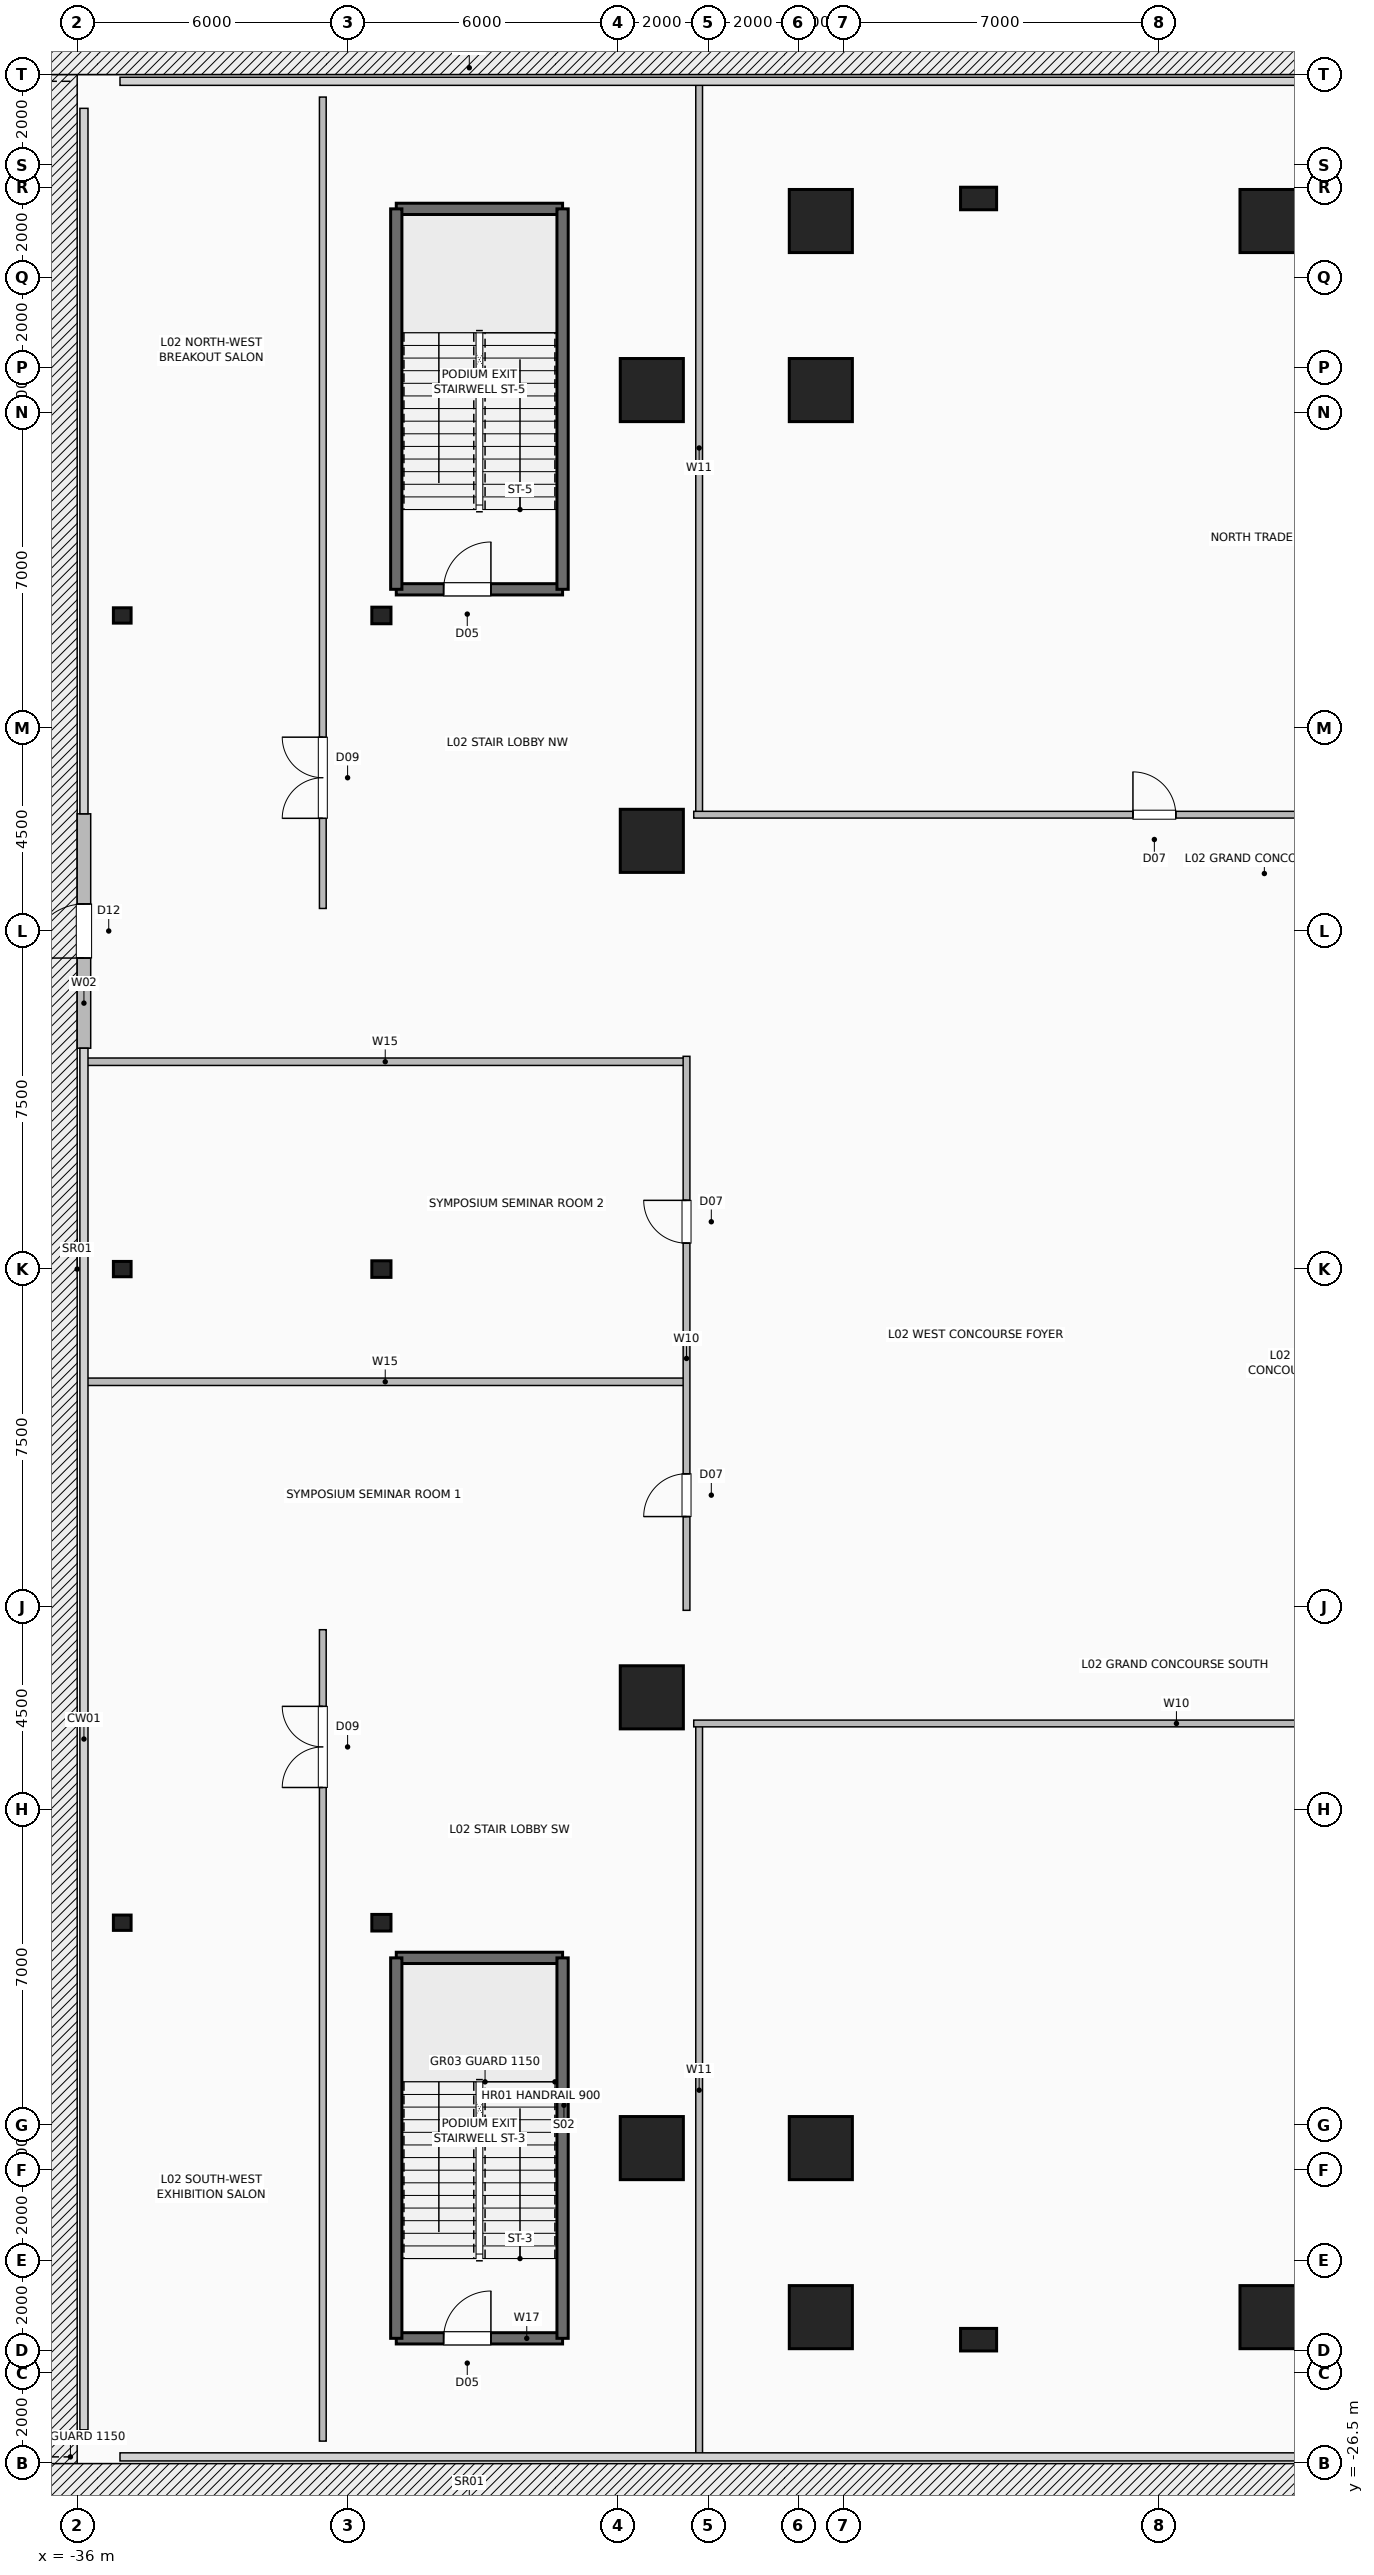
"""IFC4 building model, lengths in metres.
Left out: names, types, materials, properties, quantities, classifications, styles, units other than length and angle.
Written with IfcOpenShell. Run it as: python <this file> out.ifc"""

import sys

from ifc_helpers import new_model, si_unit, direction, frame, frame_2d, origin, origin_2d, place, context, subcontext, project, spatial, rectangle, hollow_rectangle, i_section, extrude, element, fill, save


model = new_model("IFC4")
c1 = context("Model", 3, precision=1e-05, world=origin(), true_north=direction((0.0, 1.0)))
c2 = subcontext(c1, "Body", "Model", "MODEL_VIEW")
j1 = project(units=[si_unit("LENGTHUNIT", "METRE"), si_unit("PLANEANGLEUNIT", "RADIAN")], contexts=[c1])
p1 = place(None, origin())
s1 = spatial("IfcSite", under=j1, at=p1, CompositionType="ELEMENT")
p2 = place(p1, origin())
s2 = spatial("IfcBuilding", under=s1, at=p2, CompositionType="ELEMENT")
p3 = place(p2, frame((0.0, 0.0, 10.8)))
s3 = spatial("IfcBuildingStorey", under=s2, at=p3, CompositionType="ELEMENT", Elevation=10.8)
for number, where, z_axis, x_axis in (
    (1, (-19.5, -23.25, 0.0), (0.0, 0.0, 1.0), (1.0, 0.0, 0.0)),
    (2, (-9.5, -23.25, 0.0), (0.0, 0.0, 1.0), (1.0, 0.0, 0.0)),
    (3, (-19.5, 23.25, 0.0), (0.0, 0.0, 1.0), (1.0, 0.0, 0.0)),
    (4, (-9.5, 23.25, 0.0), (0.0, 0.0, 1.0), (1.0, 0.0, 0.0)),
    (5, (-23.25, -19.5, 0.0), (0.0, 0.0, 1.0), (1.0, 0.0, 0.0)),
    (6, (-23.25, -9.5, 0.0), (0.0, 0.0, 1.0), (1.0, 0.0, 0.0)),
    (7, (-23.25, 9.5, 0.0), (0.0, 0.0, 1.0), (1.0, 0.0, 0.0)),
    (8, (-23.25, 19.5, 0.0), (0.0, 0.0, 1.0), (1.0, 0.0, 0.0)),
    (9, (-19.5, -19.5, 0.0), (0.0, 0.0, 1.0), (1.0, 0.0, 0.0)),
    (10, (-19.5, 19.5, 0.0), (0.0, 0.0, 1.0), (1.0, 0.0, 0.0)),
):
    element("IfcColumn", number, at=place(p3, frame(where, z_axis=z_axis, x_axis=x_axis)), inside=s3, PredefinedType="COLUMN", context=c2, shape_type="SweptSolid", body=[
        extrude(hollow_rectangle(XDim=1.4, YDim=1.4, WallThickness=0.06, at=origin_2d()), origin(), (0.0, 0.0, 1.0), 5.4),
    ])
for number, where, z_axis, x_axis in (
    (11, (-29.25, -14.5, 0.0), (0.0, 0.0, 1.0), (1.0, 0.0, 0.0)),
    (12, (-29.25, 0.0, 0.0), (0.0, 0.0, 1.0), (1.0, 0.0, 0.0)),
    (13, (-29.25, 14.5, 0.0), (0.0, 0.0, 1.0), (1.0, 0.0, 0.0)),
):
    element("IfcColumn", number, at=place(p3, frame(where, z_axis=z_axis, x_axis=x_axis)), inside=s3, PredefinedType="COLUMN", context=c2, shape_type="SweptSolid", body=[
        extrude(i_section(OverallWidth=0.368, OverallDepth=0.425, WebThickness=0.03, FlangeThickness=0.048, FilletRadius=0.02, at=origin_2d()), origin(), (0.0, 0.0, 1.0), 5.4),
    ])
for number, where, z_axis, x_axis in (
    (14, (-35.0, -14.5, -0.4), (0.0, 0.0, 1.0), (1.0, 0.0, 0.0)),
    (15, (-35.0, 0.0, -0.4), (0.0, 0.0, 1.0), (1.0, 0.0, 0.0)),
    (16, (-35.0, 14.5, -0.4), (0.0, 0.0, 1.0), (1.0, 0.0, 0.0)),
):
    element("IfcColumn", number, at=place(p3, frame(where, z_axis=z_axis, x_axis=x_axis)), inside=s3, PredefinedType="COLUMN", context=c2, shape_type="SweptSolid", body=[
        extrude(i_section(OverallWidth=0.34, OverallDepth=0.393, WebThickness=0.02, FlangeThickness=0.033, FilletRadius=0.02, at=origin_2d()), origin(), (0.0, 0.0, 1.0), 5.4),
    ])
for number, where, z_axis, x_axis in (
    (17, (-16.0, -23.75, 0.0), (0.0, 0.0, 1.0), (1.0, 0.0, 0.0)),
    (18, (-16.0, 23.75, 0.0), (0.0, 0.0, 1.0), (1.0, 0.0, 0.0)),
):
    element("IfcColumn", number, at=place(p3, frame(where, z_axis=z_axis, x_axis=x_axis)), inside=s3, PredefinedType="PILASTER", context=c2, shape_type="SweptSolid", body=[
        extrude(rectangle(XDim=0.5, YDim=0.8, at=origin_2d()), origin(), (0.0, 0.0, 1.0), 5.4),
    ])
p4 = place(p3, frame((-35.85, 4.9, 0.0), z_axis=(0.0, 0.0, 1.0), x_axis=(0.0, 1.0, 0.0)))
e19 = element("IfcWall", 19, at=p4, inside=s3, PredefinedType="SOLIDWALL", context=c2, shape_type="SweptSolid", body=[
    extrude(rectangle(XDim=5.2, YDim=0.3, at=frame_2d((2.6, 0.0))), origin(), (0.0, 0.0, 1.0), 5.0),
])
p5 = place(p4, frame((2.0, 0.0, 0.0)))
e20 = element("IfcOpeningElement", 20, at=p5, cuts=e19, PredefinedType="OPENING", context=c2, shape_type="SweptSolid", body=[
    extrude(rectangle(XDim=1.2, YDim=2.25, at=frame_2d((0.6, 1.125))), frame((0.0, 0.16, 0.0), z_axis=(0.0, -1.0, 0.0), x_axis=(1.0, 0.0, 0.0)), (0.0, 0.0, 1.0), 0.32),
])
p6 = place(p3, frame((-28.92, -23.72, 0.0), z_axis=(0.0, 0.0, 1.0), x_axis=(1.0, 0.0, 0.0)))
e21 = element("IfcWall", 21, at=p6, inside=s3, PredefinedType="SHEAR", context=c2, shape_type="SweptSolid", body=[
    extrude(rectangle(XDim=3.69, YDim=0.25, at=frame_2d((1.845, 0.0))), origin(), (0.0, 0.0, 1.0), 5.0),
])
p7 = place(p6, frame((1.05, 0.0, 0.0)))
e22 = element("IfcOpeningElement", 22, at=p7, cuts=e21, PredefinedType="OPENING", context=c2, shape_type="SweptSolid", body=[
    extrude(rectangle(XDim=1.05, YDim=2.08, at=frame_2d((0.525, 1.04))), frame((0.0, 0.135, 0.0), z_axis=(0.0, -1.0, 0.0), x_axis=(1.0, 0.0, 0.0)), (0.0, 0.0, 1.0), 0.27),
])
p8 = place(p3, frame((-28.92, -15.28, 0.0), z_axis=(0.0, 0.0, 1.0), x_axis=(1.0, 0.0, 0.0)))
e23 = element("IfcWall", 23, at=p8, inside=s3, PredefinedType="SHEAR", context=c2, shape_type="SweptSolid", body=[
    extrude(rectangle(XDim=3.69, YDim=0.25, at=frame_2d((1.845, 0.0))), origin(), (0.0, 0.0, 1.0), 5.0),
])
for number, where, z_axis, x_axis in (
    (24, (-28.92, -23.72, 0.0), (0.0, 0.0, 1.0), (0.0, 1.0, 0.0)),
    (25, (-25.23, -23.72, 0.0), (0.0, 0.0, 1.0), (0.0, 1.0, 0.0)),
):
    element("IfcWall", number, at=place(p3, frame(where, z_axis=z_axis, x_axis=x_axis)), inside=s3, PredefinedType="SHEAR", context=c2, shape_type="SweptSolid", body=[
        extrude(rectangle(XDim=8.44, YDim=0.25, at=frame_2d((4.22, 0.0))), origin(), (0.0, 0.0, 1.0), 5.0),
    ])
p9 = place(p3, frame((-28.92, 15.08, 0.0), z_axis=(0.0, 0.0, 1.0), x_axis=(1.0, 0.0, 0.0)))
e26 = element("IfcWall", 26, at=p9, inside=s3, PredefinedType="SHEAR", context=c2, shape_type="SweptSolid", body=[
    extrude(rectangle(XDim=3.69, YDim=0.25, at=frame_2d((1.845, 0.0))), origin(), (0.0, 0.0, 1.0), 5.0),
])
p10 = place(p9, frame((1.05, 0.0, 0.0)))
e27 = element("IfcOpeningElement", 27, at=p10, cuts=e26, PredefinedType="OPENING", context=c2, shape_type="SweptSolid", body=[
    extrude(rectangle(XDim=1.05, YDim=2.08, at=frame_2d((0.525, 1.04))), frame((0.0, 0.135, 0.0), z_axis=(0.0, -1.0, 0.0), x_axis=(1.0, 0.0, 0.0)), (0.0, 0.0, 1.0), 0.27),
])
p11 = place(p3, frame((-28.92, 23.52, 0.0), z_axis=(0.0, 0.0, 1.0), x_axis=(1.0, 0.0, 0.0)))
e28 = element("IfcWall", 28, at=p11, inside=s3, PredefinedType="SHEAR", context=c2, shape_type="SweptSolid", body=[
    extrude(rectangle(XDim=3.69, YDim=0.25, at=frame_2d((1.845, 0.0))), origin(), (0.0, 0.0, 1.0), 5.0),
])
for number, where, z_axis, x_axis in (
    (29, (-28.92, 15.08, 0.0), (0.0, 0.0, 1.0), (0.0, 1.0, 0.0)),
    (30, (-25.23, 15.08, 0.0), (0.0, 0.0, 1.0), (0.0, 1.0, 0.0)),
):
    element("IfcWall", number, at=place(p3, frame(where, z_axis=z_axis, x_axis=x_axis)), inside=s3, PredefinedType="SHEAR", context=c2, shape_type="SweptSolid", body=[
        extrude(rectangle(XDim=8.44, YDim=0.25, at=frame_2d((4.22, 0.0))), origin(), (0.0, 0.0, 1.0), 5.0),
    ])
p12 = place(p3, frame((-22.2, -26.35, 0.0), z_axis=(0.0, 0.0, 1.0), x_axis=(0.0, 1.0, 0.0)))
e31 = element("IfcWall", 31, at=p12, inside=s3, PredefinedType="PARTITIONING", context=c2, shape_type="SweptSolid", body=[
    extrude(rectangle(XDim=16.27, YDim=0.15, at=frame_2d((8.135, 0.0))), origin(), (0.0, 0.0, 1.0), 5.0),
])
p13 = place(p3, frame((-22.32, -10.08, 0.0), z_axis=(0.0, 0.0, 1.0), x_axis=(1.0, 0.0, 0.0)))
e32 = element("IfcWall", 32, at=p13, inside=s3, PredefinedType="PARTITIONING", context=c2, shape_type="SweptSolid", body=[
    extrude(rectangle(XDim=44.64, YDim=0.15, at=frame_2d((22.32, 0.0))), origin(), (0.0, 0.0, 1.0), 5.0),
])
p14 = place(p13, frame((21.42, 0.0, 0.0)))
e33 = element("IfcOpeningElement", 33, at=p14, cuts=e32, PredefinedType="OPENING", context=c2, shape_type="SweptSolid", body=[
    extrude(rectangle(XDim=1.8, YDim=2.08, at=frame_2d((0.9, 1.04))), frame((0.0, 0.085, 0.0), z_axis=(0.0, -1.0, 0.0), x_axis=(1.0, 0.0, 0.0)), (0.0, 0.0, 1.0), 0.17),
])
p15 = place(p3, frame((-22.2, 10.08, 0.0), z_axis=(0.0, 0.0, 1.0), x_axis=(0.0, 1.0, 0.0)))
e34 = element("IfcWall", 34, at=p15, inside=s3, PredefinedType="PARTITIONING", context=c2, shape_type="SweptSolid", body=[
    extrude(rectangle(XDim=16.27, YDim=0.15, at=frame_2d((8.135, 0.0))), origin(), (0.0, 0.0, 1.0), 5.0),
])
p16 = place(p3, frame((-22.32, 10.08, 0.0), z_axis=(0.0, 0.0, 1.0), x_axis=(1.0, 0.0, 0.0)))
e35 = element("IfcWall", 35, at=p16, inside=s3, PredefinedType="PARTITIONING", context=c2, shape_type="SweptSolid", body=[
    extrude(rectangle(XDim=44.64, YDim=0.15, at=frame_2d((22.32, 0.0))), origin(), (0.0, 0.0, 1.0), 5.0),
])
p17 = place(p16, frame((9.745, 0.0, 0.0)))
e36 = element("IfcOpeningElement", 36, at=p17, cuts=e35, PredefinedType="OPENING", context=c2, shape_type="SweptSolid", body=[
    extrude(rectangle(XDim=0.95, YDim=2.06, at=frame_2d((0.475, 1.03))), frame((0.0, 0.085, 0.0), z_axis=(0.0, -1.0, 0.0), x_axis=(1.0, 0.0, 0.0)), (0.0, 0.0, 1.0), 0.17),
])
p18 = place(p16, frame((25.17, 0.0, 0.0)))
e37 = element("IfcOpeningElement", 37, at=p18, cuts=e35, PredefinedType="OPENING", context=c2, shape_type="SweptSolid", body=[
    extrude(rectangle(XDim=1.8, YDim=2.08, at=frame_2d((0.9, 1.04))), frame((0.0, 0.085, 0.0), z_axis=(0.0, -1.0, 0.0), x_axis=(1.0, 0.0, 0.0)), (0.0, 0.0, 1.0), 0.17),
])
p19 = place(p16, frame((37.695, 0.0, 0.0)))
e38 = element("IfcOpeningElement", 38, at=p19, cuts=e35, PredefinedType="OPENING", context=c2, shape_type="SweptSolid", body=[
    extrude(rectangle(XDim=0.95, YDim=2.06, at=frame_2d((0.475, 1.03))), frame((0.0, 0.085, 0.0), z_axis=(0.0, -1.0, 0.0), x_axis=(1.0, 0.0, 0.0)), (0.0, 0.0, 1.0), 0.17),
])
for number, where, z_axis, x_axis in (
    (39, (-35.85, -2.5, 0.0), (0.0, 0.0, 1.0), (1.0, 0.0, 0.0)),
    (40, (-35.85, 4.6, 0.0), (0.0, 0.0, 1.0), (1.0, 0.0, 0.0)),
):
    element("IfcWall", number, at=place(p3, frame(where, z_axis=z_axis, x_axis=x_axis)), inside=s3, PredefinedType="PLUMBINGWALL", context=c2, shape_type="SweptSolid", body=[
        extrude(rectangle(XDim=13.37, YDim=0.165, at=frame_2d((6.685, 0.0))), origin(), (0.0, 0.0, 1.0), 5.0),
    ])
p20 = place(p3, frame((-22.48, -7.57, 0.0), z_axis=(0.0, 0.0, 1.0), x_axis=(0.0, 1.0, 0.0)))
e41 = element("IfcWall", 41, at=p20, inside=s3, PredefinedType="PARTITIONING", context=c2, shape_type="SweptSolid", body=[
    extrude(rectangle(XDim=12.29, YDim=0.15, at=frame_2d((6.145, 0.0))), origin(), (0.0, 0.0, 1.0), 5.0),
])
p21 = place(p20, frame((2.08, 0.0, 0.0)))
e42 = element("IfcOpeningElement", 42, at=p21, cuts=e41, PredefinedType="OPENING", context=c2, shape_type="SweptSolid", body=[
    extrude(rectangle(XDim=0.95, YDim=2.06, at=frame_2d((0.475, 1.03))), frame((0.0, 0.085, 0.0), z_axis=(0.0, -1.0, 0.0), x_axis=(1.0, 0.0, 0.0)), (0.0, 0.0, 1.0), 0.17),
])
p22 = place(p20, frame((8.145, 0.0, 0.0)))
e43 = element("IfcOpeningElement", 43, at=p22, cuts=e41, PredefinedType="OPENING", context=c2, shape_type="SweptSolid", body=[
    extrude(rectangle(XDim=0.95, YDim=2.06, at=frame_2d((0.475, 1.03))), frame((0.0, 0.085, 0.0), z_axis=(0.0, -1.0, 0.0), x_axis=(1.0, 0.0, 0.0)), (0.0, 0.0, 1.0), 0.17),
])
p23 = place(p3, frame((-30.55, -26.0, 0.0), z_axis=(0.0, 0.0, 1.0), x_axis=(0.0, 1.0, 0.0)))
e44 = element("IfcWall", 44, at=p23, inside=s3, PredefinedType="PARTITIONING", context=c2, shape_type="SweptSolid", body=[
    extrude(rectangle(XDim=18.0, YDim=0.15, at=frame_2d((9.0, 0.0))), origin(), (0.0, 0.0, 1.0), 5.0),
])
p24 = place(p23, frame((14.5, 0.0, 0.0)))
e45 = element("IfcOpeningElement", 45, at=p24, cuts=e44, PredefinedType="OPENING", context=c2, shape_type="SweptSolid", body=[
    extrude(rectangle(XDim=1.8, YDim=2.08, at=frame_2d((0.9, 1.04))), frame((0.0, 0.085, 0.0), z_axis=(0.0, -1.0, 0.0), x_axis=(1.0, 0.0, 0.0)), (0.0, 0.0, 1.0), 0.17),
])
p25 = place(p3, frame((-30.55, 8.0, 0.0), z_axis=(0.0, 0.0, 1.0), x_axis=(0.0, 1.0, 0.0)))
e46 = element("IfcWall", 46, at=p25, inside=s3, PredefinedType="PARTITIONING", context=c2, shape_type="SweptSolid", body=[
    extrude(rectangle(XDim=18.0, YDim=0.15, at=frame_2d((9.0, 0.0))), origin(), (0.0, 0.0, 1.0), 5.0),
])
p26 = place(p25, frame((2.0, 0.0, 0.0)))
e47 = element("IfcOpeningElement", 47, at=p26, cuts=e46, PredefinedType="OPENING", context=c2, shape_type="SweptSolid", body=[
    extrude(rectangle(XDim=1.8, YDim=2.08, at=frame_2d((0.9, 1.04))), frame((0.0, 0.085, 0.0), z_axis=(0.0, -1.0, 0.0), x_axis=(1.0, 0.0, 0.0)), (0.0, 0.0, 1.0), 0.17),
])
p27 = place(p5, origin())
e48 = element("IfcDoor", 48, at=p27, inside=s3, OperationType="SINGLE_SWING_LEFT", PredefinedType="DOOR", context=c2, shape_type="SweptSolid", body=[
    extrude(rectangle(XDim=1.2, YDim=2.25, at=frame_2d((0.6, 1.125))), frame((0.0, 0.025, 0.0), z_axis=(0.0, -1.0, 0.0), x_axis=(1.0, 0.0, 0.0)), (0.0, 0.0, 1.0), 0.05),
])
fill(e20, e48)
p28 = place(p7, origin())
e49 = element("IfcDoor", 49, at=p28, inside=s3, OperationType="SINGLE_SWING_RIGHT", PredefinedType="DOOR", context=c2, shape_type="SweptSolid", body=[
    extrude(rectangle(XDim=1.05, YDim=2.08, at=frame_2d((0.525, 1.04))), frame((0.0, 0.025, 0.0), z_axis=(0.0, -1.0, 0.0), x_axis=(1.0, 0.0, 0.0)), (0.0, 0.0, 1.0), 0.05),
])
fill(e22, e49)
p29 = place(p10, origin())
e50 = element("IfcDoor", 50, at=p29, inside=s3, OperationType="SINGLE_SWING_RIGHT", PredefinedType="DOOR", context=c2, shape_type="SweptSolid", body=[
    extrude(rectangle(XDim=1.05, YDim=2.08, at=frame_2d((0.525, 1.04))), frame((0.0, 0.025, 0.0), z_axis=(0.0, -1.0, 0.0), x_axis=(1.0, 0.0, 0.0)), (0.0, 0.0, 1.0), 0.05),
])
fill(e27, e50)
p30 = place(p17, origin())
e51 = element("IfcDoor", 51, at=p30, inside=s3, OperationType="SINGLE_SWING_LEFT", PredefinedType="DOOR", context=c2, shape_type="SweptSolid", body=[
    extrude(rectangle(XDim=0.95, YDim=2.06, at=frame_2d((0.475, 1.03))), frame((0.0, 0.025, 0.0), z_axis=(0.0, -1.0, 0.0), x_axis=(1.0, 0.0, 0.0)), (0.0, 0.0, 1.0), 0.05),
])
fill(e36, e51)
p31 = place(p21, origin())
e52 = element("IfcDoor", 52, at=p31, inside=s3, OperationType="SINGLE_SWING_LEFT", PredefinedType="DOOR", context=c2, shape_type="SweptSolid", body=[
    extrude(rectangle(XDim=0.95, YDim=2.06, at=frame_2d((0.475, 1.03))), frame((0.0, 0.025, 0.0), z_axis=(0.0, -1.0, 0.0), x_axis=(1.0, 0.0, 0.0)), (0.0, 0.0, 1.0), 0.05),
])
fill(e42, e52)
p32 = place(p22, origin())
e53 = element("IfcDoor", 53, at=p32, inside=s3, OperationType="SINGLE_SWING_RIGHT", PredefinedType="DOOR", context=c2, shape_type="SweptSolid", body=[
    extrude(rectangle(XDim=0.95, YDim=2.06, at=frame_2d((0.475, 1.03))), frame((0.0, 0.025, 0.0), z_axis=(0.0, -1.0, 0.0), x_axis=(1.0, 0.0, 0.0)), (0.0, 0.0, 1.0), 0.05),
])
fill(e43, e53)
p33 = place(p24, origin())
e54 = element("IfcDoor", 54, at=p33, inside=s3, OperationType="DOUBLE_DOOR_SINGLE_SWING", PredefinedType="DOOR", context=c2, shape_type="SweptSolid", body=[
    extrude(rectangle(XDim=1.8, YDim=2.08, at=frame_2d((0.9, 1.04))), frame((0.0, 0.025, 0.0), z_axis=(0.0, -1.0, 0.0), x_axis=(1.0, 0.0, 0.0)), (0.0, 0.0, 1.0), 0.05),
])
fill(e45, e54)
p34 = place(p26, origin())
e55 = element("IfcDoor", 55, at=p34, inside=s3, OperationType="DOUBLE_DOOR_SINGLE_SWING", PredefinedType="DOOR", context=c2, shape_type="SweptSolid", body=[
    extrude(rectangle(XDim=1.8, YDim=2.08, at=frame_2d((0.9, 1.04))), frame((0.0, 0.025, 0.0), z_axis=(0.0, -1.0, 0.0), x_axis=(1.0, 0.0, 0.0)), (0.0, 0.0, 1.0), 0.05),
])
fill(e47, e55)
save(model, sys.argv[1])
